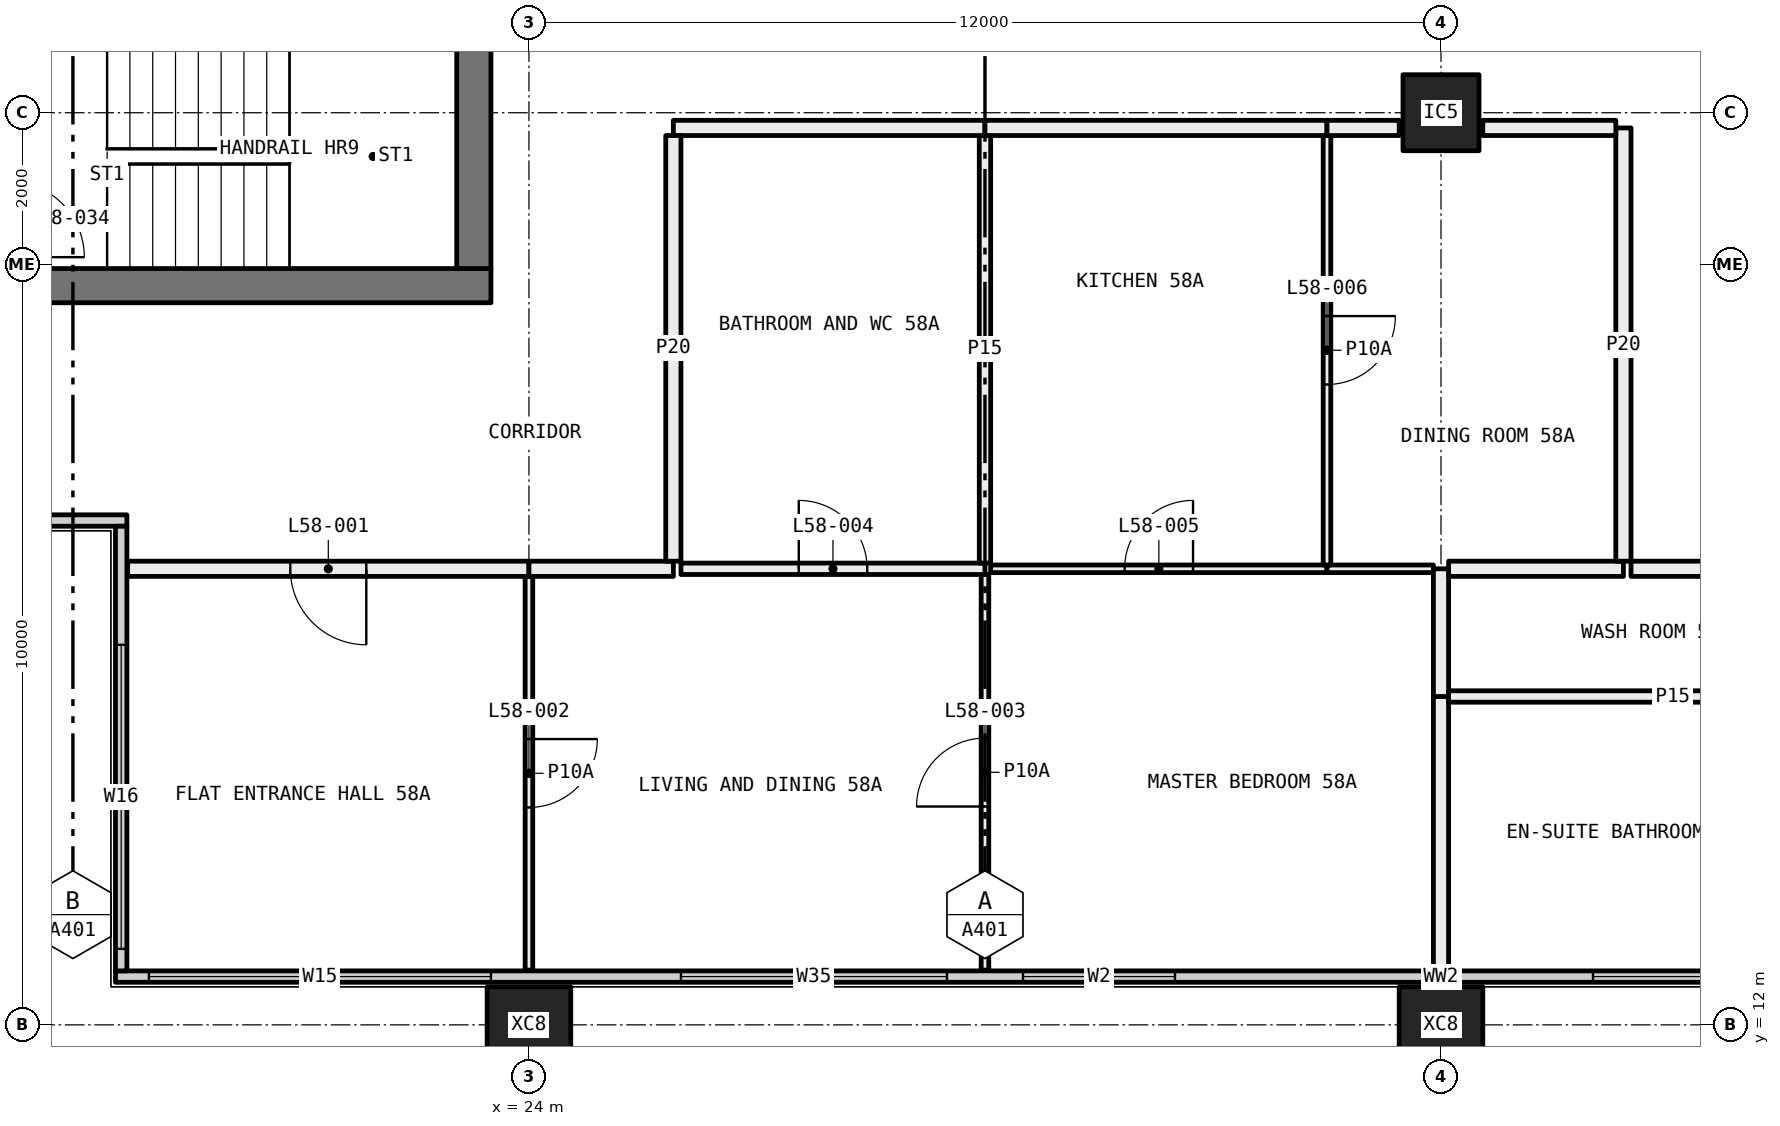
"""IFC4 building model, lengths in metres.
Left out: names, types, materials, properties, quantities, classifications, styles, units other than length and angle.
Written with IfcOpenShell. Run it as: python <this file> out.ifc"""

import sys

from ifc_helpers import new_model, si_unit, direction, frame, frame_2d, origin, origin_2d, place, context, subcontext, project, spatial, rectangle, hollow_rectangle, extrude, element, fill, save


model = new_model("IFC4")
c1 = context("Model", 3, precision=1e-05, world=origin(), true_north=direction((0.0, 1.0)))
c2 = subcontext(c1, "Body", "Model", "MODEL_VIEW")
j1 = project(units=[si_unit("LENGTHUNIT", "METRE"), si_unit("PLANEANGLEUNIT", "RADIAN")], contexts=[c1])
p1 = place(None, origin())
s1 = spatial("IfcSite", under=j1, at=p1, CompositionType="ELEMENT")
p2 = place(p1, origin())
s2 = spatial("IfcBuilding", under=s1, at=p2, CompositionType="ELEMENT")
p3 = place(p2, frame((0.0, 0.0, 217.95)))
s3 = spatial("IfcBuildingStorey", under=s2, at=p3, CompositionType="ELEMENT", Elevation=217.95)
for number, where, z_axis, x_axis in (
    (1, (24.0, 12.0, -0.4), (0.0, 0.0, 1.0), (1.0, 0.0, 0.0)),
    (2, (36.0, 12.0, -0.4), (0.0, 0.0, 1.0), (1.0, 0.0, 0.0)),
):
    element("IfcColumn", number, at=place(p3, frame(where, z_axis=z_axis, x_axis=x_axis)), inside=s3, PredefinedType="COLUMN", context=c2, shape_type="SweptSolid", body=[
        extrude(hollow_rectangle(XDim=1.1, YDim=1.0, WallThickness=0.04, at=origin_2d()), origin(), (0.0, 0.0, 1.0), 3.45),
    ])
p4 = place(p3, frame((36.0, 24.0, 0.0), z_axis=(0.0, 0.0, 1.0), x_axis=(1.0, 0.0, 0.0)))
e3 = element("IfcColumn", 3, at=p4, inside=s3, PredefinedType="COLUMN", context=c2, shape_type="SweptSolid", body=[
    extrude(hollow_rectangle(XDim=1.0, YDim=1.0, WallThickness=0.04, at=origin_2d()), origin(), (0.0, 0.0, 1.0), 3.05),
])
p5 = place(p3, frame((18.56, 12.635, 0.0), z_axis=(0.0, 0.0, 1.0), x_axis=(1.0, 0.0, 0.0)))
e4 = element("IfcWall", 4, at=p5, inside=s3, PredefinedType="ELEMENTEDWALL", context=c2, shape_type="SweptSolid", body=[
    extrude(rectangle(XDim=34.88, YDim=0.15, at=frame_2d((17.44, 0.0))), origin(), (0.0, 0.0, 1.0), 3.05),
])
p6 = place(p5, frame((0.44, 0.0, 0.45)))
e5 = element("IfcOpeningElement", 5, at=p6, cuts=e4, PredefinedType="OPENING", context=c2, shape_type="SweptSolid", body=[
    extrude(rectangle(XDim=4.5, YDim=2.55, at=frame_2d((2.25, 1.275))), frame((0.0, 0.085, 0.0), z_axis=(0.0, -1.0, 0.0), x_axis=(1.0, 0.0, 0.0)), (0.0, 0.0, 1.0), 0.17),
])
p7 = place(p5, frame((7.44, 0.0, 0.45)))
e6 = element("IfcOpeningElement", 6, at=p7, cuts=e4, PredefinedType="OPENING", context=c2, shape_type="SweptSolid", body=[
    extrude(rectangle(XDim=3.5, YDim=2.55, at=frame_2d((1.75, 1.275))), frame((0.0, 0.085, 0.0), z_axis=(0.0, -1.0, 0.0), x_axis=(1.0, 0.0, 0.0)), (0.0, 0.0, 1.0), 0.17),
])
p8 = place(p5, frame((11.94, 0.0, 0.45)))
e7 = element("IfcOpeningElement", 7, at=p8, cuts=e4, PredefinedType="OPENING", context=c2, shape_type="SweptSolid", body=[
    extrude(rectangle(XDim=2.0, YDim=2.55, at=frame_2d((1.0, 1.275))), frame((0.0, 0.085, 0.0), z_axis=(0.0, -1.0, 0.0), x_axis=(1.0, 0.0, 0.0)), (0.0, 0.0, 1.0), 0.17),
])
p9 = place(p5, frame((19.44, 0.0, 0.45)))
e8 = element("IfcOpeningElement", 8, at=p9, cuts=e4, PredefinedType="OPENING", context=c2, shape_type="SweptSolid", body=[
    extrude(rectangle(XDim=3.5, YDim=2.55, at=frame_2d((1.75, 1.275))), frame((0.0, 0.085, 0.0), z_axis=(0.0, -1.0, 0.0), x_axis=(1.0, 0.0, 0.0)), (0.0, 0.0, 1.0), 0.17),
])
p10 = place(p5, frame((23.94, 0.0, 0.45)))
e9 = element("IfcOpeningElement", 9, at=p10, cuts=e4, PredefinedType="OPENING", context=c2, shape_type="SweptSolid", body=[
    extrude(rectangle(XDim=3.5, YDim=2.55, at=frame_2d((1.75, 1.275))), frame((0.0, 0.085, 0.0), z_axis=(0.0, -1.0, 0.0), x_axis=(1.0, 0.0, 0.0)), (0.0, 0.0, 1.0), 0.17),
])
p11 = place(p5, frame((29.94, 0.0, 0.45)))
e10 = element("IfcOpeningElement", 10, at=p11, cuts=e4, PredefinedType="OPENING", context=c2, shape_type="SweptSolid", body=[
    extrude(rectangle(XDim=4.5, YDim=2.55, at=frame_2d((2.25, 1.275))), frame((0.0, 0.085, 0.0), z_axis=(0.0, -1.0, 0.0), x_axis=(1.0, 0.0, 0.0)), (0.0, 0.0, 1.0), 0.17),
])
p12 = place(p3, frame((12.56, 18.635, 0.0), z_axis=(0.0, 0.0, 1.0), x_axis=(1.0, 0.0, 0.0)))
e11 = element("IfcWall", 11, at=p12, inside=s3, PredefinedType="ELEMENTEDWALL", context=c2, shape_type="SweptSolid", body=[
    extrude(rectangle(XDim=6.15, YDim=0.15, at=frame_2d((3.075, 0.0))), origin(), (0.0, 0.0, 1.0), 3.05),
])
p13 = place(p12, frame((0.44, 0.0, 0.45)))
e12 = element("IfcOpeningElement", 12, at=p13, cuts=e11, PredefinedType="OPENING", context=c2, shape_type="SweptSolid", body=[
    extrude(rectangle(XDim=4.0, YDim=2.55, at=frame_2d((2.0, 1.275))), frame((0.0, 0.085, 0.0), z_axis=(0.0, -1.0, 0.0), x_axis=(1.0, 0.0, 0.0)), (0.0, 0.0, 1.0), 0.17),
])
p14 = place(p3, frame((18.635, 12.71, 0.0), z_axis=(0.0, 0.0, 1.0), x_axis=(0.0, 1.0, 0.0)))
e13 = element("IfcWall", 13, at=p14, inside=s3, PredefinedType="ELEMENTEDWALL", context=c2, shape_type="SweptSolid", body=[
    extrude(rectangle(XDim=5.85, YDim=0.15, at=frame_2d((2.925, 0.0))), origin(), (0.0, 0.0, 1.0), 3.05),
])
p15 = place(p14, frame((0.29, 0.0, 0.45)))
e14 = element("IfcOpeningElement", 14, at=p15, cuts=e13, PredefinedType="OPENING", context=c2, shape_type="SweptSolid", body=[
    extrude(rectangle(XDim=4.0, YDim=2.55, at=frame_2d((2.0, 1.275))), frame((0.0, 0.085, 0.0), z_axis=(0.0, -1.0, 0.0), x_axis=(1.0, 0.0, 0.0)), (0.0, 0.0, 1.0), 0.17),
])
p16 = place(p3, frame((24.0, 12.72, 0.0), z_axis=(0.0, 0.0, 1.0), x_axis=(0.0, 1.0, 0.0)))
e15 = element("IfcWall", 15, at=p16, inside=s3, PredefinedType="PARTITIONING", context=c2, shape_type="SweptSolid", body=[
    extrude(rectangle(XDim=5.18, YDim=0.1, at=frame_2d((2.59, 0.0))), origin(), (0.0, 0.0, 1.0), 3.05),
])
p17 = place(p16, frame((2.14, 0.0, 0.0)))
e16 = element("IfcOpeningElement", 16, at=p17, cuts=e15, PredefinedType="OPENING", context=c2, shape_type="SweptSolid", body=[
    extrude(rectangle(XDim=0.9, YDim=2.1, at=frame_2d((0.45, 1.05))), frame((0.0, 0.06, 0.0), z_axis=(0.0, -1.0, 0.0), x_axis=(1.0, 0.0, 0.0)), (0.0, 0.0, 1.0), 0.12),
])
p18 = place(p3, frame((24.0, 18.0, 0.0), z_axis=(0.0, 0.0, 1.0), x_axis=(-1.0, 0.0, 0.0)))
e17 = element("IfcWall", 17, at=p18, inside=s3, PredefinedType="PARTITIONING", context=c2, shape_type="SweptSolid", body=[
    extrude(rectangle(XDim=5.28, YDim=0.2, at=frame_2d((2.64, 0.0))), origin(), (0.0, 0.0, 1.0), 3.05),
])
p19 = place(p18, frame((2.14, 0.0, 0.0)))
e18 = element("IfcOpeningElement", 18, at=p19, cuts=e17, PredefinedType="OPENING", context=c2, shape_type="SweptSolid", body=[
    extrude(rectangle(XDim=1.0, YDim=2.1, at=frame_2d((0.5, 1.05))), frame((0.0, 0.11, 0.0), z_axis=(0.0, -1.0, 0.0), x_axis=(1.0, 0.0, 0.0)), (0.0, 0.0, 1.0), 0.22),
])
p20 = place(p3, frame((30.0, 12.72, 0.0), z_axis=(0.0, 0.0, 1.0), x_axis=(0.0, 1.0, 0.0)))
e19 = element("IfcWall", 19, at=p20, inside=s3, PredefinedType="PARTITIONING", context=c2, shape_type="SweptSolid", body=[
    extrude(rectangle(XDim=5.205, YDim=0.1, at=frame_2d((2.603, 0.0))), origin(), (0.0, 0.0, 1.0), 3.05),
])
p21 = place(p20, frame((2.153, 0.0, 0.0)))
e20 = element("IfcOpeningElement", 20, at=p21, cuts=e19, PredefinedType="OPENING", context=c2, shape_type="SweptSolid", body=[
    extrude(rectangle(XDim=0.9, YDim=2.1, at=frame_2d((0.45, 1.05))), frame((0.0, 0.06, 0.0), z_axis=(0.0, -1.0, 0.0), x_axis=(1.0, 0.0, 0.0)), (0.0, 0.0, 1.0), 0.12),
])
p22 = place(p3, frame((30.0, 18.0, 0.0), z_axis=(0.0, 0.0, 1.0), x_axis=(-1.0, 0.0, 0.0)))
e21 = element("IfcWall", 21, at=p22, inside=s3, PredefinedType="PARTITIONING", context=c2, shape_type="SweptSolid", body=[
    extrude(rectangle(XDim=4.0, YDim=0.15, at=frame_2d((2.0, 0.0))), origin(), (0.0, 0.0, 1.0), 3.05),
])
p23 = place(p22, frame((1.55, 0.0, 0.0)))
e22 = element("IfcOpeningElement", 22, at=p23, cuts=e21, PredefinedType="OPENING", context=c2, shape_type="SweptSolid", body=[
    extrude(rectangle(XDim=0.9, YDim=2.1, at=frame_2d((0.45, 1.05))), frame((0.0, 0.085, 0.0), z_axis=(0.0, -1.0, 0.0), x_axis=(1.0, 0.0, 0.0)), (0.0, 0.0, 1.0), 0.17),
])
p24 = place(p3, frame((25.9, 18.0, 0.0), z_axis=(0.0, 0.0, 1.0), x_axis=(-1.0, 0.0, 0.0)))
e23 = element("IfcWall", 23, at=p24, inside=s3, PredefinedType="PARTITIONING", context=c2, shape_type="SweptSolid", body=[
    extrude(rectangle(XDim=1.9, YDim=0.2, at=frame_2d((0.95, 0.0))), origin(), (0.0, 0.0, 1.0), 3.05),
])
p25 = place(p3, frame((34.5, 18.0, 0.0), z_axis=(0.0, 0.0, 1.0), x_axis=(-1.0, 0.0, 0.0)))
e24 = element("IfcWall", 24, at=p25, inside=s3, PredefinedType="PARTITIONING", context=c2, shape_type="SweptSolid", body=[
    extrude(rectangle(XDim=4.425, YDim=0.1, at=frame_2d((2.212, 0.0))), origin(), (0.0, 0.0, 1.0), 3.05),
])
p26 = place(p25, frame((1.762, 0.0, 0.0)))
e25 = element("IfcOpeningElement", 25, at=p26, cuts=e24, PredefinedType="OPENING", context=c2, shape_type="SweptSolid", body=[
    extrude(rectangle(XDim=0.9, YDim=2.1, at=frame_2d((0.45, 1.05))), frame((0.0, 0.06, 0.0), z_axis=(0.0, -1.0, 0.0), x_axis=(1.0, 0.0, 0.0)), (0.0, 0.0, 1.0), 0.12),
])
p27 = place(p3, frame((35.9, 18.0, 0.0), z_axis=(0.0, 0.0, 1.0), x_axis=(-1.0, 0.0, 0.0)))
e26 = element("IfcWall", 26, at=p27, inside=s3, PredefinedType="PARTITIONING", context=c2, shape_type="SweptSolid", body=[
    extrude(rectangle(XDim=1.4, YDim=0.1, at=frame_2d((0.7, 0.0))), origin(), (0.0, 0.0, 1.0), 3.05),
])
p28 = place(p3, frame((36.0, 12.72, 0.0), z_axis=(0.0, 0.0, 1.0), x_axis=(0.0, 1.0, 0.0)))
e27 = element("IfcWall", 27, at=p28, inside=s3, PredefinedType="PARTITIONING", context=c2, shape_type="SweptSolid", body=[
    extrude(rectangle(XDim=3.6, YDim=0.2, at=frame_2d((1.8, 0.0))), origin(), (0.0, 0.0, 1.0), 2.45),
])
p29 = place(p3, frame((36.0, 16.32, 0.0), z_axis=(0.0, 0.0, 1.0), x_axis=(0.0, 1.0, 0.0)))
e28 = element("IfcWall", 28, at=p29, inside=s3, PredefinedType="PARTITIONING", context=c2, shape_type="SweptSolid", body=[
    extrude(rectangle(XDim=1.68, YDim=0.2, at=frame_2d((0.84, 0.0))), origin(), (0.0, 0.0, 1.0), 2.45),
])
p30 = place(p3, frame((30.0, 18.075, 0.0), z_axis=(0.0, 0.0, 1.0), x_axis=(0.0, 1.0, 0.0)))
e29 = element("IfcWall", 29, at=p30, inside=s3, PredefinedType="PARTITIONING", context=c2, shape_type="SweptSolid", body=[
    extrude(rectangle(XDim=5.625, YDim=0.15, at=frame_2d((2.812, 0.0))), origin(), (0.0, 0.0, 1.0), 3.05),
])
p31 = place(p3, frame((30.0, 23.8, 0.0), z_axis=(0.0, 0.0, 1.0), x_axis=(-1.0, 0.0, 0.0)))
e30 = element("IfcWall", 30, at=p31, inside=s3, PredefinedType="PARTITIONING", context=c2, shape_type="SweptSolid", body=[
    extrude(rectangle(XDim=4.1, YDim=0.2, at=frame_2d((2.05, 0.0))), origin(), (0.0, 0.0, 1.0), 3.05),
])
p32 = place(p3, frame((25.9, 23.7, 0.0), z_axis=(0.0, 0.0, 1.0), x_axis=(0.0, -1.0, 0.0)))
e31 = element("IfcWall", 31, at=p32, inside=s3, PredefinedType="PARTITIONING", context=c2, shape_type="SweptSolid", body=[
    extrude(rectangle(XDim=5.6, YDim=0.2, at=frame_2d((2.8, 0.0))), origin(), (0.0, 0.0, 1.0), 3.05),
])
p33 = place(p3, frame((34.5, 18.05, 0.0), z_axis=(0.0, 0.0, 1.0), x_axis=(0.0, 1.0, 0.0)))
e32 = element("IfcWall", 32, at=p33, inside=s3, PredefinedType="PARTITIONING", context=c2, shape_type="SweptSolid", body=[
    extrude(rectangle(XDim=5.65, YDim=0.1, at=frame_2d((2.825, 0.0))), origin(), (0.0, 0.0, 1.0), 3.05),
])
p34 = place(p33, frame((2.375, 0.0, 0.0)))
e33 = element("IfcOpeningElement", 33, at=p34, cuts=e32, PredefinedType="OPENING", context=c2, shape_type="SweptSolid", body=[
    extrude(rectangle(XDim=0.9, YDim=2.1, at=frame_2d((0.45, 1.05))), frame((0.0, 0.06, 0.0), z_axis=(0.0, -1.0, 0.0), x_axis=(1.0, 0.0, 0.0)), (0.0, 0.0, 1.0), 0.12),
])
p35 = place(p3, frame((34.5, 23.8, 0.0), z_axis=(0.0, 0.0, 1.0), x_axis=(-1.0, 0.0, 0.0)))
e34 = element("IfcWall", 34, at=p35, inside=s3, PredefinedType="PARTITIONING", context=c2, shape_type="SweptSolid", body=[
    extrude(rectangle(XDim=4.5, YDim=0.2, at=frame_2d((2.25, 0.0))), origin(), (0.0, 0.0, 1.0), 3.05),
])
p36 = place(p3, frame((36.1, 18.0, 0.0), z_axis=(0.0, 0.0, 1.0), x_axis=(1.0, 0.0, 0.0)))
e35 = element("IfcWall", 35, at=p36, inside=s3, PredefinedType="PARTITIONING", context=c2, shape_type="SweptSolid", body=[
    extrude(rectangle(XDim=2.3, YDim=0.2, at=frame_2d((1.15, 0.0))), origin(), (0.0, 0.0, 1.0), 3.05),
])
p37 = place(p3, frame((35.45, 23.8, 0.0), z_axis=(0.0, 0.0, 1.0), x_axis=(-1.0, 0.0, 0.0)))
e36 = element("IfcWall", 36, at=p37, inside=s3, PredefinedType="PARTITIONING", context=c2, shape_type="SweptSolid", body=[
    extrude(rectangle(XDim=0.95, YDim=0.2, at=frame_2d((0.475, 0.0))), origin(), (0.0, 0.0, 1.0), 3.05),
])
p38 = place(p3, frame((38.4, 18.1, 0.0), z_axis=(0.0, 0.0, 1.0), x_axis=(0.0, 1.0, 0.0)))
e37 = element("IfcWall", 37, at=p38, inside=s3, PredefinedType="PARTITIONING", context=c2, shape_type="SweptSolid", body=[
    extrude(rectangle(XDim=5.7, YDim=0.2, at=frame_2d((2.85, 0.0))), origin(), (0.0, 0.0, 1.0), 3.05),
])
p39 = place(p3, frame((38.3, 23.8, 0.0), z_axis=(0.0, 0.0, 1.0), x_axis=(-1.0, 0.0, 0.0)))
e38 = element("IfcWall", 38, at=p39, inside=s3, PredefinedType="PARTITIONING", context=c2, shape_type="SweptSolid", body=[
    extrude(rectangle(XDim=1.75, YDim=0.2, at=frame_2d((0.875, 0.0))), origin(), (0.0, 0.0, 1.0), 3.05),
])
p40 = place(p3, frame((42.0, 16.32, 0.0), z_axis=(0.0, 0.0, 1.0), x_axis=(-1.0, 0.0, 0.0)))
e39 = element("IfcWall", 39, at=p40, inside=s3, PredefinedType="PARTITIONING", context=c2, shape_type="SweptSolid", body=[
    extrude(rectangle(XDim=5.9, YDim=0.15, at=frame_2d((2.95, 0.0))), origin(), (0.0, 0.0, 1.0), 3.05),
])
p41 = place(p3, frame((40.8, 18.0, 0.0), z_axis=(0.0, 0.0, 1.0), x_axis=(-1.0, 0.0, 0.0)))
e40 = element("IfcWall", 40, at=p41, inside=s3, PredefinedType="PARTITIONING", context=c2, shape_type="SweptSolid", body=[
    extrude(rectangle(XDim=2.3, YDim=0.2, at=frame_2d((1.15, 0.0))), origin(), (0.0, 0.0, 1.0), 3.05),
])
p42 = place(p3, frame((12.5, 21.725, 0.0), z_axis=(0.0, 0.0, 1.0), x_axis=(1.0, 0.0, 0.0)))
e41 = element("IfcWall", 41, at=p42, inside=s3, PredefinedType="SHEAR", context=c2, shape_type="SweptSolid", body=[
    extrude(rectangle(XDim=11.0, YDim=0.45, at=frame_2d((5.5, 0.0))), origin(), (0.0, 0.0, 1.0), 3.05),
])
p43 = place(p42, frame((1.125, 0.0, 0.0)))
e42 = element("IfcOpeningElement", 42, at=p43, cuts=e41, PredefinedType="OPENING", context=c2, shape_type="SweptSolid", body=[
    extrude(rectangle(XDim=1.0, YDim=2.1, at=frame_2d((0.5, 1.05))), frame((0.0, 0.235, 0.0), z_axis=(0.0, -1.0, 0.0), x_axis=(1.0, 0.0, 0.0)), (0.0, 0.0, 1.0), 0.47),
])
p44 = place(p3, frame((23.275, 21.95, 0.0), z_axis=(0.0, 0.0, 1.0), x_axis=(0.0, 1.0, 0.0)))
e43 = element("IfcWall", 43, at=p44, inside=s3, PredefinedType="SHEAR", context=c2, shape_type="SweptSolid", body=[
    extrude(rectangle(XDim=16.1, YDim=0.45, at=frame_2d((8.05, 0.0))), origin(), (0.0, 0.0, 1.0), 3.05),
])
p45 = place(p44, frame((7.25, 0.0, 0.0)))
e44 = element("IfcOpeningElement", 44, at=p45, cuts=e43, PredefinedType="OPENING", context=c2, shape_type="SweptSolid", body=[
    extrude(rectangle(XDim=1.6, YDim=2.1, at=frame_2d((0.8, 1.05))), frame((0.0, 0.235, 0.0), z_axis=(0.0, -1.0, 0.0), x_axis=(1.0, 0.0, 0.0)), (0.0, 0.0, 1.0), 0.47),
])
p46 = place(p6, origin())
e45 = element("IfcWindow", 45, at=p46, inside=s3, PartitioningType="SINGLE_PANEL", PredefinedType="WINDOW", context=c2, shape_type="SweptSolid", body=[
    extrude(rectangle(XDim=4.5, YDim=2.55, at=frame_2d((2.25, 1.275))), frame((0.0, 0.03, 0.0), z_axis=(0.0, -1.0, 0.0), x_axis=(1.0, 0.0, 0.0)), (0.0, 0.0, 1.0), 0.06),
])
fill(e5, e45)
p47 = place(p7, origin())
e46 = element("IfcWindow", 46, at=p47, inside=s3, PartitioningType="SINGLE_PANEL", PredefinedType="WINDOW", context=c2, shape_type="SweptSolid", body=[
    extrude(rectangle(XDim=3.5, YDim=2.55, at=frame_2d((1.75, 1.275))), frame((0.0, 0.03, 0.0), z_axis=(0.0, -1.0, 0.0), x_axis=(1.0, 0.0, 0.0)), (0.0, 0.0, 1.0), 0.06),
])
fill(e6, e46)
p48 = place(p8, origin())
e47 = element("IfcWindow", 47, at=p48, inside=s3, PartitioningType="SINGLE_PANEL", PredefinedType="WINDOW", context=c2, shape_type="SweptSolid", body=[
    extrude(rectangle(XDim=2.0, YDim=2.55, at=frame_2d((1.0, 1.275))), frame((0.0, 0.03, 0.0), z_axis=(0.0, -1.0, 0.0), x_axis=(1.0, 0.0, 0.0)), (0.0, 0.0, 1.0), 0.06),
])
fill(e7, e47)
p49 = place(p9, origin())
e48 = element("IfcWindow", 48, at=p49, inside=s3, PartitioningType="SINGLE_PANEL", PredefinedType="WINDOW", context=c2, shape_type="SweptSolid", body=[
    extrude(rectangle(XDim=3.5, YDim=2.55, at=frame_2d((1.75, 1.275))), frame((0.0, 0.03, 0.0), z_axis=(0.0, -1.0, 0.0), x_axis=(1.0, 0.0, 0.0)), (0.0, 0.0, 1.0), 0.06),
])
fill(e8, e48)
p50 = place(p15, origin())
e49 = element("IfcWindow", 49, at=p50, inside=s3, PartitioningType="SINGLE_PANEL", PredefinedType="WINDOW", context=c2, shape_type="SweptSolid", body=[
    extrude(rectangle(XDim=4.0, YDim=2.55, at=frame_2d((2.0, 1.275))), frame((0.0, 0.03, 0.0), z_axis=(0.0, -1.0, 0.0), x_axis=(1.0, 0.0, 0.0)), (0.0, 0.0, 1.0), 0.06),
])
fill(e14, e49)
p51 = place(p19, origin())
e50 = element("IfcDoor", 50, at=p51, inside=s3, OperationType="SINGLE_SWING_RIGHT", PredefinedType="DOOR", context=c2, shape_type="SweptSolid", body=[
    extrude(rectangle(XDim=1.0, YDim=2.1, at=frame_2d((0.5, 1.05))), frame((0.0, 0.025, 0.0), z_axis=(0.0, -1.0, 0.0), x_axis=(1.0, 0.0, 0.0)), (0.0, 0.0, 1.0), 0.05),
])
fill(e18, e50)
p52 = place(p17, frame((0.9, 0.0, 0.0), x_axis=(-1.0, 0.0, 0.0)))
e51 = element("IfcDoor", 51, at=p52, inside=s3, OperationType="SINGLE_SWING_RIGHT", PredefinedType="DOOR", context=c2, shape_type="SweptSolid", body=[
    extrude(rectangle(XDim=0.9, YDim=2.1, at=frame_2d((0.45, 1.05))), frame((0.0, 0.025, 0.0), z_axis=(0.0, -1.0, 0.0), x_axis=(1.0, 0.0, 0.0)), (0.0, 0.0, 1.0), 0.05),
])
fill(e16, e51)
p53 = place(p21, origin())
e52 = element("IfcDoor", 52, at=p53, inside=s3, OperationType="SINGLE_SWING_RIGHT", PredefinedType="DOOR", context=c2, shape_type="SweptSolid", body=[
    extrude(rectangle(XDim=0.9, YDim=2.1, at=frame_2d((0.45, 1.05))), frame((0.0, 0.025, 0.0), z_axis=(0.0, -1.0, 0.0), x_axis=(1.0, 0.0, 0.0)), (0.0, 0.0, 1.0), 0.05),
])
fill(e20, e52)
p54 = place(p23, frame((0.9, 0.0, 0.0), x_axis=(-1.0, 0.0, 0.0)))
e53 = element("IfcDoor", 53, at=p54, inside=s3, OperationType="SINGLE_SWING_RIGHT", PredefinedType="DOOR", context=c2, shape_type="SweptSolid", body=[
    extrude(rectangle(XDim=0.9, YDim=2.1, at=frame_2d((0.45, 1.05))), frame((0.0, 0.025, 0.0), z_axis=(0.0, -1.0, 0.0), x_axis=(1.0, 0.0, 0.0)), (0.0, 0.0, 1.0), 0.05),
])
fill(e22, e53)
p55 = place(p26, frame((0.9, 0.0, 0.0), x_axis=(-1.0, 0.0, 0.0)))
e54 = element("IfcDoor", 54, at=p55, inside=s3, OperationType="SINGLE_SWING_LEFT", PredefinedType="DOOR", context=c2, shape_type="SweptSolid", body=[
    extrude(rectangle(XDim=0.9, YDim=2.1, at=frame_2d((0.45, 1.05))), frame((0.0, 0.025, 0.0), z_axis=(0.0, -1.0, 0.0), x_axis=(1.0, 0.0, 0.0)), (0.0, 0.0, 1.0), 0.05),
])
fill(e25, e54)
p56 = place(p34, frame((0.9, 0.0, 0.0), x_axis=(-1.0, 0.0, 0.0)))
e55 = element("IfcDoor", 55, at=p56, inside=s3, OperationType="SINGLE_SWING_RIGHT", PredefinedType="DOOR", context=c2, shape_type="SweptSolid", body=[
    extrude(rectangle(XDim=0.9, YDim=2.1, at=frame_2d((0.45, 1.05))), frame((0.0, 0.025, 0.0), z_axis=(0.0, -1.0, 0.0), x_axis=(1.0, 0.0, 0.0)), (0.0, 0.0, 1.0), 0.05),
])
fill(e33, e55)
save(model, sys.argv[1])
